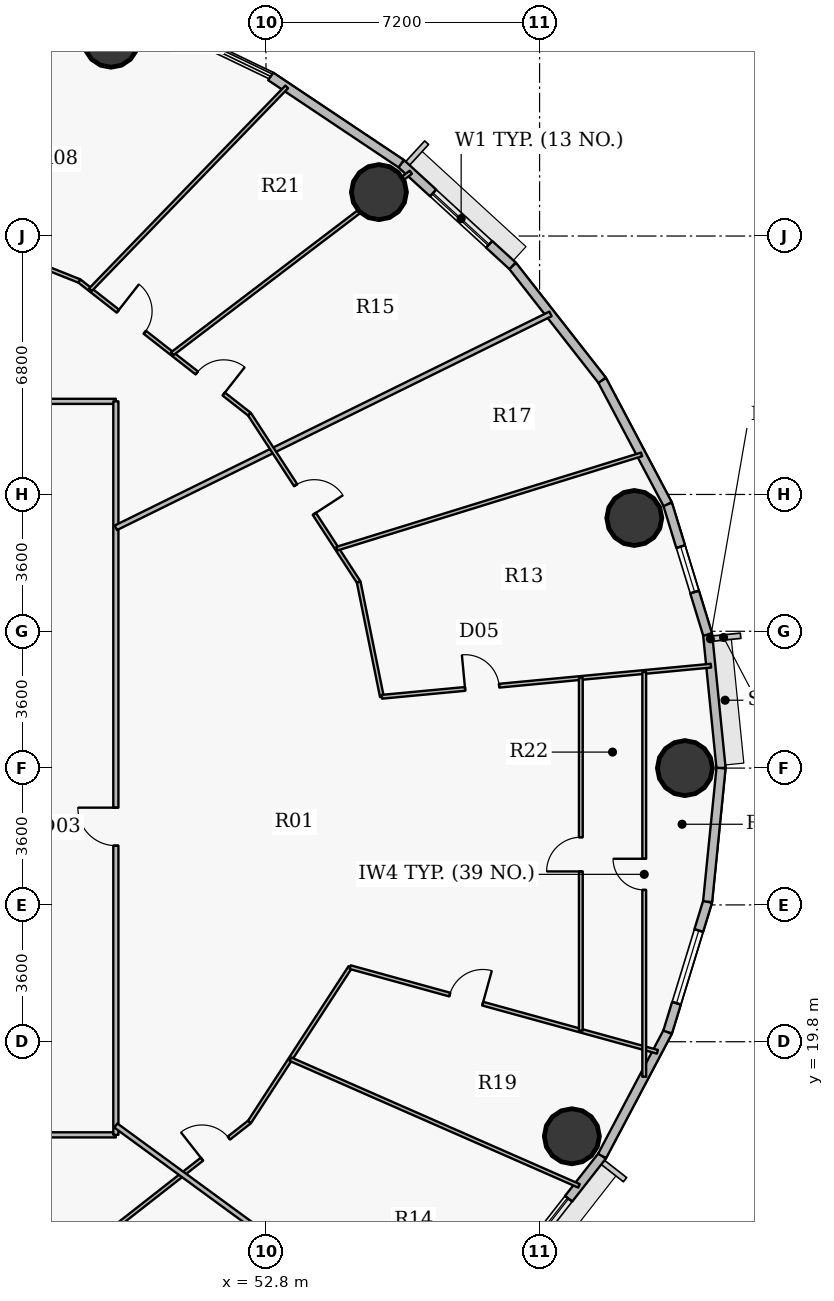
"""IFC4 building model, lengths in metres.
Left out: names, types, materials, properties, quantities, classifications, styles, units other than length and angle.
Written with IfcOpenShell. Run it as: python <this file> out.ifc"""

import sys

from ifc_helpers import new_model, si_unit, direction, frame, frame_2d, origin, origin_2d, place, context, subcontext, project, spatial, rectangle, hollow_circle, extrude, source, transform, mapped, element, fill, save


model = new_model("IFC4")
c1 = context("Model", 3, precision=1e-05, world=origin(), true_north=direction((0.0, 1.0)))
c2 = subcontext(c1, "Body", "Model", "MODEL_VIEW")
j1 = project(units=[si_unit("LENGTHUNIT", "METRE"), si_unit("PLANEANGLEUNIT", "RADIAN")], contexts=[c1])
p1 = place(None, origin())
s1 = spatial("IfcSite", under=j1, at=p1, CompositionType="ELEMENT")
p2 = place(p1, origin())
s2 = spatial("IfcBuilding", under=s1, at=p2, CompositionType="ELEMENT")
p3 = place(p2, frame((0.0, 0.0, 142.2)))
s3 = spatial("IfcBuildingStorey", under=s2, at=p3, CompositionType="ELEMENT", Elevation=142.2)
for number, where, z_axis, x_axis in (
    (1, (63.825, 27.0, 0.0), (0.0, 0.0, 1.0), (1.0, 0.0, 0.0)),
    (2, (62.493, 33.581, 0.0), (0.0, 0.0, 1.0), (1.0, 0.0, 0.0)),
    (3, (55.773, 42.156, 0.0), (0.0, 0.0, 1.0), (1.0, 0.0, 0.0)),
    (4, (48.722, 46.165, 0.0), (0.0, 0.0, 1.0), (1.0, 0.0, 0.0)),
    (5, (60.849, 17.312, 0.0), (0.0, 0.0, 1.0), (1.0, 0.0, 0.0)),
):
    element("IfcColumn", number, at=place(p3, frame(where, z_axis=z_axis, x_axis=x_axis)), inside=s3, PredefinedType="COLUMN", context=c2, shape_type="SweptSolid", body=[
        extrude(hollow_circle(Radius=0.725, WallThickness=0.042, at=origin_2d()), origin(), (0.0, 0.0, 1.0), 3.75),
    ])
p4 = place(p3, frame((64.422, 30.515, 0.0), z_axis=(0.0, 0.0, 1.0), x_axis=(0.099989468229, -0.994988495533, 0.0)))
e6 = element("IfcWall", 6, at=p4, inside=s3, PredefinedType="SOLIDWALL", context=c2, shape_type="SweptSolid", body=[
    extrude(rectangle(XDim=3.533, YDim=0.24, at=frame_2d((1.767, 0.0))), origin(), (0.0, 0.0, 1.0), 3.45),
])
p5 = place(p3, frame((63.37, 33.945, 0.0), z_axis=(0.0, 0.0, 1.0), x_axis=(0.293124431344, -0.956074300329, 0.0)))
e7 = element("IfcWall", 7, at=p5, inside=s3, PredefinedType="SOLIDWALL", context=c2, shape_type="SweptSolid", body=[
    extrude(rectangle(XDim=3.587, YDim=0.24, at=frame_2d((1.793, 0.0))), origin(), (0.0, 0.0, 1.0), 3.45),
])
p6 = place(p5, frame((1.169, 0.0, 0.9)))
e8 = element("IfcOpeningElement", 8, at=p6, cuts=e7, PredefinedType="OPENING", context=c2, shape_type="SweptSolid", body=[
    extrude(rectangle(XDim=1.25, YDim=1.65, at=origin_2d()), frame((0.625, 0.13, 0.825), z_axis=(0.0, -1.0, 0.0), x_axis=(1.0, 0.0, 0.0)), (0.0, 0.0, 1.0), 0.26),
])
p7 = place(p3, frame((61.645, 37.206, 0.0), z_axis=(0.0, 0.0, 1.0), x_axis=(0.467614004126, -0.883932770716, 0.0)))
e9 = element("IfcWall", 9, at=p7, inside=s3, PredefinedType="SOLIDWALL", context=c2, shape_type="SweptSolid", body=[
    extrude(rectangle(XDim=3.689, YDim=0.24, at=frame_2d((1.844, 0.0))), origin(), (0.0, 0.0, 1.0), 3.45),
])
p8 = place(p3, frame((59.289, 40.217, 0.0), z_axis=(0.0, 0.0, 1.0), x_axis=(0.616272103517, -0.787533297345, 0.0)))
e10 = element("IfcWall", 10, at=p8, inside=s3, PredefinedType="SOLIDWALL", context=c2, shape_type="SweptSolid", body=[
    extrude(rectangle(XDim=3.823, YDim=0.24, at=frame_2d((1.912, 0.0))), origin(), (0.0, 0.0, 1.0), 3.45),
])
p9 = place(p3, frame((56.358, 42.903, 0.0), z_axis=(0.0, 0.0, 1.0), x_axis=(0.737113356241, -0.675769117414, 0.0)))
e11 = element("IfcWall", 11, at=p9, inside=s3, PredefinedType="SOLIDWALL", context=c2, shape_type="SweptSolid", body=[
    extrude(rectangle(XDim=3.976, YDim=0.24, at=frame_2d((1.988, 0.0))), origin(), (0.0, 0.0, 1.0), 3.45),
])
p10 = place(p9, frame((1.141, 0.0, 0.9)))
e12 = element("IfcOpeningElement", 12, at=p10, cuts=e11, PredefinedType="OPENING", context=c2, shape_type="SweptSolid", body=[
    extrude(rectangle(XDim=2.0, YDim=1.75, at=origin_2d()), frame((1.0, 0.13, 0.875), z_axis=(0.0, -1.0, 0.0), x_axis=(1.0, 0.0, 0.0)), (0.0, 0.0, 1.0), 0.26),
])
p11 = place(p3, frame((52.925, 45.199, 0.0), z_axis=(0.0, 0.0, 1.0), x_axis=(0.831221811447, -0.555940914284, 0.0)))
e13 = element("IfcWall", 13, at=p11, inside=s3, PredefinedType="SOLIDWALL", context=c2, shape_type="SweptSolid", body=[
    extrude(rectangle(XDim=4.13, YDim=0.24, at=frame_2d((2.065, 0.0))), origin(), (0.0, 0.0, 1.0), 3.45),
])
p12 = place(p3, frame((61.645, 16.794, 0.0), z_axis=(0.0, 0.0, 1.0), x_axis=(-0.616272103517, -0.787533297345, 0.0)))
e14 = element("IfcWall", 14, at=p12, inside=s3, PredefinedType="SOLIDWALL", context=c2, shape_type="SweptSolid", body=[
    extrude(rectangle(XDim=3.823, YDim=0.24, at=frame_2d((1.912, 0.0))), origin(), (0.0, 0.0, 1.0), 3.45),
])
p13 = place(p12, frame((1.43, 0.0, 0.9)))
e15 = element("IfcOpeningElement", 15, at=p13, cuts=e14, PredefinedType="OPENING", context=c2, shape_type="SweptSolid", body=[
    extrude(rectangle(XDim=1.6, YDim=1.75, at=origin_2d()), frame((0.8, 0.13, 0.875), z_axis=(0.0, -1.0, 0.0), x_axis=(1.0, 0.0, 0.0)), (0.0, 0.0, 1.0), 0.26),
])
p14 = place(p3, frame((63.37, 20.055, 0.0), z_axis=(0.0, 0.0, 1.0), x_axis=(-0.467614004126, -0.883932770716, 0.0)))
e16 = element("IfcWall", 16, at=p14, inside=s3, PredefinedType="SOLIDWALL", context=c2, shape_type="SweptSolid", body=[
    extrude(rectangle(XDim=3.689, YDim=0.24, at=frame_2d((1.844, 0.0))), origin(), (0.0, 0.0, 1.0), 3.45),
])
p15 = place(p3, frame((64.422, 23.485, 0.0), z_axis=(0.0, 0.0, 1.0), x_axis=(-0.293124431344, -0.956074300329, 0.0)))
e17 = element("IfcWall", 17, at=p15, inside=s3, PredefinedType="SOLIDWALL", context=c2, shape_type="SweptSolid", body=[
    extrude(rectangle(XDim=3.587, YDim=0.24, at=frame_2d((1.793, 0.0))), origin(), (0.0, 0.0, 1.0), 3.45),
])
p16 = place(p15, frame((0.794, 0.0, 0.9)))
e18 = element("IfcOpeningElement", 18, at=p16, cuts=e17, PredefinedType="OPENING", context=c2, shape_type="SweptSolid", body=[
    extrude(rectangle(XDim=2.0, YDim=1.75, at=origin_2d()), frame((1.0, 0.13, 0.875), z_axis=(0.0, -1.0, 0.0), x_axis=(1.0, 0.0, 0.0)), (0.0, 0.0, 1.0), 0.26),
])
p17 = place(p3, frame((64.775, 27.0, 0.0), z_axis=(0.0, 0.0, 1.0), x_axis=(-0.099989468229, -0.994988495533, 0.0)))
e19 = element("IfcWall", 19, at=p17, inside=s3, PredefinedType="SOLIDWALL", context=c2, shape_type="SweptSolid", body=[
    extrude(rectangle(XDim=3.533, YDim=0.24, at=frame_2d((1.767, 0.0))), origin(), (0.0, 0.0, 1.0), 3.45),
])
p18 = place(p3, frame((36.774, 36.65, 0.0), z_axis=(0.0, 0.0, 1.0), x_axis=(1.0, 0.0, 0.0)))
e20 = element("IfcWall", 20, at=p18, inside=s3, PredefinedType="PARTITIONING", context=c2, shape_type="SweptSolid", body=[
    extrude(rectangle(XDim=12.076, YDim=0.135, at=frame_2d((6.038, 0.0))), origin(), (0.0, 0.0, 1.0), 2.885),
])
p19 = place(p18, frame((5.538, 0.0, 0.0)))
e21 = element("IfcOpeningElement", 21, at=p19, cuts=e20, PredefinedType="OPENING", context=c2, shape_type="SweptSolid", body=[
    extrude(rectangle(XDim=1.0, YDim=2.15, at=origin_2d()), frame((0.5, 0.078, 1.075), z_axis=(0.0, -1.0, 0.0), x_axis=(1.0, 0.0, 0.0)), (0.0, 0.0, 1.0), 0.155),
])
p20 = place(p3, frame((38.477, 17.35, 0.0), z_axis=(0.0, 0.0, 1.0), x_axis=(1.0, 0.0, 0.0)))
e22 = element("IfcWall", 22, at=p20, inside=s3, PredefinedType="PARTITIONING", context=c2, shape_type="SweptSolid", body=[
    extrude(rectangle(XDim=10.373, YDim=0.135, at=frame_2d((5.187, 0.0))), origin(), (0.0, 0.0, 1.0), 2.885),
])
p21 = place(p20, frame((4.687, 0.0, 0.0)))
e23 = element("IfcOpeningElement", 23, at=p21, cuts=e22, PredefinedType="OPENING", context=c2, shape_type="SweptSolid", body=[
    extrude(rectangle(XDim=1.0, YDim=2.15, at=origin_2d()), frame((0.5, 0.078, 1.075), z_axis=(0.0, -1.0, 0.0), x_axis=(1.0, 0.0, 0.0)), (0.0, 0.0, 1.0), 0.155),
])
p22 = place(p3, frame((42.724, 41.877, 0.0), z_axis=(0.0, 0.0, 1.0), x_axis=(0.928806258388, -0.370565695093, 0.0)))
e24 = element("IfcWall", 24, at=p22, inside=s3, PredefinedType="PARTITIONING", context=c2, shape_type="SweptSolid", body=[
    extrude(rectangle(XDim=5.562, YDim=0.1, at=frame_2d((2.781, 0.0))), origin(), (0.0, 0.0, 1.0), 2.885),
])
p23 = place(p3, frame((47.891, 14.184, 0.0), z_axis=(0.0, 0.0, 1.0), x_axis=(0.787333679705, 0.616527109544, 0.0)))
e25 = element("IfcWall", 25, at=p23, inside=s3, PredefinedType="PARTITIONING", context=c2, shape_type="SweptSolid", body=[
    extrude(rectangle(XDim=5.685, YDim=0.1, at=frame_2d((2.842, 0.0))), origin(), (0.0, 0.0, 1.0), 2.885),
])
p24 = place(p23, frame((4.096, 0.0, 0.0)))
e26 = element("IfcOpeningElement", 26, at=p24, cuts=e25, PredefinedType="OPENING", context=c2, shape_type="SweptSolid", body=[
    extrude(rectangle(XDim=0.9, YDim=2.1, at=origin_2d()), frame((0.45, 0.06, 1.05), z_axis=(0.0, -1.0, 0.0), x_axis=(1.0, 0.0, 0.0)), (0.0, 0.0, 1.0), 0.12),
])
p25 = place(p3, frame((47.891, 39.816, 0.0), z_axis=(0.0, 0.0, 1.0), x_axis=(0.787347250317, -0.61650977885, 0.0)))
e27 = element("IfcWall", 27, at=p25, inside=s3, PredefinedType="PARTITIONING", context=c2, shape_type="SweptSolid", body=[
    extrude(rectangle(XDim=5.683, YDim=0.1, at=frame_2d((2.842, 0.0))), origin(), (0.0, 0.0, 1.0), 2.885),
])
p26 = place(p25, frame((3.923, 0.0, 0.0)))
e28 = element("IfcOpeningElement", 28, at=p26, cuts=e27, PredefinedType="OPENING", context=c2, shape_type="SweptSolid", body=[
    extrude(rectangle(XDim=0.9, YDim=2.1, at=origin_2d()), frame((0.45, 0.06, 1.05), z_axis=(0.0, -1.0, 0.0), x_axis=(1.0, 0.0, 0.0)), (0.0, 0.0, 1.0), 0.12),
])
p27 = place(p25, frame((1.286, 0.0, 0.0)))
e29 = element("IfcOpeningElement", 29, at=p27, cuts=e27, PredefinedType="OPENING", context=c2, shape_type="SweptSolid", body=[
    extrude(rectangle(XDim=0.9, YDim=2.1, at=origin_2d()), frame((0.45, 0.06, 1.05), z_axis=(0.0, -1.0, 0.0), x_axis=(1.0, 0.0, 0.0)), (0.0, 0.0, 1.0), 0.12),
])
p28 = place(p3, frame((48.182, 39.588, 0.0), z_axis=(0.0, 0.0, 1.0), x_axis=(0.695422522839, 0.718601081775, 0.0)))
e30 = element("IfcWall", 30, at=p28, inside=s3, PredefinedType="PARTITIONING", context=c2, shape_type="SweptSolid", body=[
    extrude(rectangle(XDim=7.426, YDim=0.1, at=frame_2d((3.713, 0.0))), origin(), (0.0, 0.0, 1.0), 2.885),
])
p29 = place(p3, frame((48.85, 17.35, 0.0), z_axis=(0.0, 0.0, 1.0), x_axis=(0.0, 1.0, 0.0)))
e31 = element("IfcWall", 31, at=p29, inside=s3, PredefinedType="PARTITIONING", context=c2, shape_type="SweptSolid", body=[
    extrude(rectangle(XDim=19.3, YDim=0.135, at=frame_2d((9.65, 0.0))), origin(), (0.0, 0.0, 1.0), 2.885),
])
p30 = place(p29, frame((7.609, 0.0, 0.0)))
e32 = element("IfcOpeningElement", 32, at=p30, cuts=e31, PredefinedType="OPENING", context=c2, shape_type="SweptSolid", body=[
    extrude(rectangle(XDim=1.0, YDim=2.15, at=origin_2d()), frame((0.5, 0.078, 1.075), z_axis=(0.0, -1.0, 0.0), x_axis=(1.0, 0.0, 0.0)), (0.0, 0.0, 1.0), 0.155),
])
p31 = place(p3, frame((48.85, 17.595, 0.0), z_axis=(0.0, 0.0, 1.0), x_axis=(0.806958414, -0.590608261096, 0.0)))
e33 = element("IfcWall", 33, at=p31, inside=s3, PredefinedType="PARTITIONING", context=c2, shape_type="SweptSolid", body=[
    extrude(rectangle(XDim=10.063, YDim=0.135, at=frame_2d((5.032, 0.0))), origin(), (0.0, 0.0, 1.0), 2.885),
])
p32 = place(p3, frame((48.85, 33.323, 0.0), z_axis=(0.0, 0.0, 1.0), x_axis=(0.897255437174, 0.44151181237, 0.0)))
e34 = element("IfcWall", 34, at=p32, inside=s3, PredefinedType="PARTITIONING", context=c2, shape_type="SweptSolid", body=[
    extrude(rectangle(XDim=12.746, YDim=0.135, at=frame_2d((6.373, 0.0))), origin(), (0.0, 0.0, 1.0), 2.885),
])
p33 = place(p3, frame((50.334, 37.903, 0.0), z_axis=(0.0, 0.0, 1.0), x_axis=(0.795918180565, 0.60540420369, 0.0)))
e35 = element("IfcWall", 35, at=p33, inside=s3, PredefinedType="PARTITIONING", context=c2, shape_type="SweptSolid", body=[
    extrude(rectangle(XDim=7.887, YDim=0.1, at=frame_2d((3.944, 0.0))), origin(), (0.0, 0.0, 1.0), 2.885),
])
p34 = place(p3, frame((52.366, 17.689, 0.0), z_axis=(0.0, 0.0, 1.0), x_axis=(0.545413870093, 0.838166874978, 0.0)))
e36 = element("IfcWall", 36, at=p34, inside=s3, PredefinedType="PARTITIONING", context=c2, shape_type="SweptSolid", body=[
    extrude(rectangle(XDim=4.859, YDim=0.1, at=frame_2d((2.43, 0.0))), origin(), (0.0, 0.0, 1.0), 2.885),
])
p35 = place(p3, frame((52.366, 36.311, 0.0), z_axis=(0.0, 0.0, 1.0), x_axis=(0.545405249109, -0.838172484781, 0.0)))
e37 = element("IfcWall", 37, at=p35, inside=s3, PredefinedType="PARTITIONING", context=c2, shape_type="SweptSolid", body=[
    extrude(rectangle(XDim=5.269, YDim=0.1, at=frame_2d((2.634, 0.0))), origin(), (0.0, 0.0, 1.0), 2.885),
])
p36 = place(p35, frame((2.228, 0.0, 0.0)))
e38 = element("IfcOpeningElement", 38, at=p36, cuts=e37, PredefinedType="OPENING", context=c2, shape_type="SweptSolid", body=[
    extrude(rectangle(XDim=0.9, YDim=2.1, at=origin_2d()), frame((0.45, 0.06, 1.05), z_axis=(0.0, -1.0, 0.0), x_axis=(1.0, 0.0, 0.0)), (0.0, 0.0, 1.0), 0.12),
])
p37 = place(p3, frame((53.442, 19.342, 0.0), z_axis=(0.0, 0.0, 1.0), x_axis=(0.91563160904, -0.402018353469, 0.0)))
e39 = element("IfcWall", 39, at=p37, inside=s3, PredefinedType="PARTITIONING", context=c2, shape_type="SweptSolid", body=[
    extrude(rectangle(XDim=8.294, YDim=0.1, at=frame_2d((4.147, 0.0))), origin(), (0.0, 0.0, 1.0), 2.885),
])
p38 = place(p3, frame((54.668, 32.774, 0.0), z_axis=(0.0, 0.0, 1.0), x_axis=(0.955345753083, 0.295490257144, 0.0)))
e40 = element("IfcWall", 40, at=p38, inside=s3, PredefinedType="PARTITIONING", context=c2, shape_type="SweptSolid", body=[
    extrude(rectangle(XDim=8.39, YDim=0.1, at=frame_2d((4.195, 0.0))), origin(), (0.0, 0.0, 1.0), 2.885),
])
p39 = place(p3, frame((55.017, 21.762, 0.0), z_axis=(0.0, 0.0, 1.0), x_axis=(0.964092156587, -0.265567907714, 0.0)))
e41 = element("IfcWall", 41, at=p39, inside=s3, PredefinedType="PARTITIONING", context=c2, shape_type="SweptSolid", body=[
    extrude(rectangle(XDim=8.385, YDim=0.1, at=frame_2d((4.192, 0.0))), origin(), (0.0, 0.0, 1.0), 2.885),
])
p40 = place(p39, frame((2.717, 0.0, 0.0)))
e42 = element("IfcOpeningElement", 42, at=p40, cuts=e41, PredefinedType="OPENING", context=c2, shape_type="SweptSolid", body=[
    extrude(rectangle(XDim=0.9, YDim=2.1, at=origin_2d()), frame((0.45, 0.06, 1.05), z_axis=(0.0, -1.0, 0.0), x_axis=(1.0, 0.0, 0.0)), (0.0, 0.0, 1.0), 0.12),
])
p41 = place(p3, frame((55.24, 31.895, 0.0), z_axis=(0.0, 0.0, 1.0), x_axis=(0.198189059207, -0.980163811213, 0.0)))
e43 = element("IfcWall", 43, at=p41, inside=s3, PredefinedType="PARTITIONING", context=c2, shape_type="SweptSolid", body=[
    extrude(rectangle(XDim=3.08, YDim=0.1, at=frame_2d((1.54, 0.0))), origin(), (0.0, 0.0, 1.0), 2.885),
])
p42 = place(p3, frame((55.85, 28.876, 0.0), z_axis=(0.0, 0.0, 1.0), x_axis=(0.995563342767, 0.094093732729, 0.0)))
e44 = element("IfcWall", 44, at=p42, inside=s3, PredefinedType="PARTITIONING", context=c2, shape_type="SweptSolid", body=[
    extrude(rectangle(XDim=8.697, YDim=0.1, at=frame_2d((4.349, 0.0))), origin(), (0.0, 0.0, 1.0), 2.885),
])
p43 = place(p42, frame((2.199, 0.0, 0.0)))
e45 = element("IfcOpeningElement", 45, at=p43, cuts=e44, PredefinedType="OPENING", context=c2, shape_type="SweptSolid", body=[
    extrude(rectangle(XDim=0.9, YDim=2.1, at=origin_2d()), frame((0.45, 0.06, 1.05), z_axis=(0.0, -1.0, 0.0), x_axis=(1.0, 0.0, 0.0)), (0.0, 0.0, 1.0), 0.12),
])
p44 = place(p3, frame((61.085, 20.09, 0.0), z_axis=(0.0, 0.0, 1.0), x_axis=(0.0, 1.0, 0.0)))
e46 = element("IfcWall", 46, at=p44, inside=s3, PredefinedType="PARTITIONING", context=c2, shape_type="SweptSolid", body=[
    extrude(rectangle(XDim=9.281, YDim=0.1, at=frame_2d((4.641, 0.0))), origin(), (0.0, 0.0, 1.0), 2.885),
])
p45 = place(p44, frame((4.19, 0.0, 0.0)))
e47 = element("IfcOpeningElement", 47, at=p45, cuts=e46, PredefinedType="OPENING", context=c2, shape_type="SweptSolid", body=[
    extrude(rectangle(XDim=0.9, YDim=2.1, at=origin_2d()), frame((0.45, 0.06, 1.05), z_axis=(0.0, -1.0, 0.0), x_axis=(1.0, 0.0, 0.0)), (0.0, 0.0, 1.0), 0.12),
])
p46 = place(p3, frame((62.754, 18.88, 0.0), z_axis=(0.0, 0.0, 1.0), x_axis=(0.0, 1.0, 0.0)))
e48 = element("IfcWall", 48, at=p46, inside=s3, PredefinedType="PARTITIONING", context=c2, shape_type="SweptSolid", body=[
    extrude(rectangle(XDim=10.649, YDim=0.1, at=frame_2d((5.325, 0.0))), origin(), (0.0, 0.0, 1.0), 2.885),
])
p47 = place(p46, frame((4.915, 0.0, 0.0)))
e49 = element("IfcOpeningElement", 49, at=p47, cuts=e48, PredefinedType="OPENING", context=c2, shape_type="SweptSolid", body=[
    extrude(rectangle(XDim=0.82, YDim=2.1, at=origin_2d()), frame((0.41, 0.06, 1.05), z_axis=(0.0, -1.0, 0.0), x_axis=(1.0, 0.0, 0.0)), (0.0, 0.0, 1.0), 0.12),
])
m1 = source(origin(), c2, "Body", "SweptSolid", [
    extrude(rectangle(XDim=2.0, YDim=1.75, at=origin_2d()), frame((1.0, 0.03, 0.875), z_axis=(0.0, -1.0, 0.0), x_axis=(1.0, 0.0, 0.0)), (0.0, 0.0, 1.0), 0.06),
])
p48 = place(p10, origin())
e50 = element("IfcWindow", 50, at=p48, inside=s3, PartitioningType="DOUBLE_PANEL_VERTICAL", PredefinedType="WINDOW", context=c2, shape_type="MappedRepresentation", body=[
    mapped(m1, transform((0.0, 0.0, 0.0), x_axis=(1.0, 0.0, 0.0), y_axis=(0.0, 1.0, 0.0), z_axis=(0.0, 0.0, 1.0), scale=1.0)),
])
fill(e12, e50)
m2 = source(origin(), c2, "Body", "SweptSolid", [
    extrude(rectangle(XDim=1.6, YDim=1.75, at=origin_2d()), frame((0.8, 0.03, 0.875), z_axis=(0.0, -1.0, 0.0), x_axis=(1.0, 0.0, 0.0)), (0.0, 0.0, 1.0), 0.06),
])
p49 = place(p13, origin())
e51 = element("IfcWindow", 51, at=p49, inside=s3, PartitioningType="DOUBLE_PANEL_VERTICAL", PredefinedType="WINDOW", context=c2, shape_type="MappedRepresentation", body=[
    mapped(m2, transform((0.0, 0.0, 0.0), x_axis=(1.0, 0.0, 0.0), y_axis=(0.0, 1.0, 0.0), z_axis=(0.0, 0.0, 1.0), scale=1.0)),
])
fill(e15, e51)
p50 = place(p16, origin())
e52 = element("IfcWindow", 52, at=p50, inside=s3, PartitioningType="DOUBLE_PANEL_VERTICAL", PredefinedType="WINDOW", context=c2, shape_type="MappedRepresentation", body=[
    mapped(m1, transform((0.0, 0.0, 0.0), x_axis=(1.0, 0.0, 0.0), y_axis=(0.0, 1.0, 0.0), z_axis=(0.0, 0.0, 1.0), scale=1.0)),
])
fill(e18, e52)
m3 = source(origin(), c2, "Body", "SweptSolid", [
    extrude(rectangle(XDim=1.25, YDim=1.65, at=origin_2d()), frame((0.625, 0.03, 0.825), z_axis=(0.0, -1.0, 0.0), x_axis=(1.0, 0.0, 0.0)), (0.0, 0.0, 1.0), 0.06),
])
p51 = place(p6, origin())
e53 = element("IfcWindow", 53, at=p51, inside=s3, PartitioningType="SINGLE_PANEL", PredefinedType="WINDOW", context=c2, shape_type="MappedRepresentation", body=[
    mapped(m3, transform((0.0, 0.0, 0.0), x_axis=(1.0, 0.0, 0.0), y_axis=(0.0, 1.0, 0.0), z_axis=(0.0, 0.0, 1.0), scale=1.0)),
])
fill(e8, e53)
m4 = source(origin(), c2, "Body", "SweptSolid", [
    extrude(rectangle(XDim=1.0, YDim=2.15, at=origin_2d()), frame((0.5, 0.025, 1.075), z_axis=(0.0, -1.0, 0.0), x_axis=(1.0, 0.0, 0.0)), (0.0, 0.0, 1.0), 0.05),
])
p52 = place(p30, origin())
e54 = element("IfcDoor", 54, at=p52, inside=s3, OperationType="SINGLE_SWING_RIGHT", PredefinedType="DOOR", context=c2, shape_type="MappedRepresentation", body=[
    mapped(m4, transform((0.0, 0.0, 0.0), x_axis=(1.0, 0.0, 0.0), y_axis=(0.0, 1.0, 0.0), z_axis=(0.0, 0.0, 1.0), scale=1.0)),
])
fill(e32, e54)
m5 = source(origin(), c2, "Body", "SweptSolid", [
    extrude(rectangle(XDim=0.9, YDim=2.1, at=origin_2d()), frame((0.45, 0.025, 1.05), z_axis=(0.0, -1.0, 0.0), x_axis=(1.0, 0.0, 0.0)), (0.0, 0.0, 1.0), 0.05),
])
p53 = place(p24, origin())
e55 = element("IfcDoor", 55, at=p53, inside=s3, OperationType="SINGLE_SWING_LEFT", PredefinedType="DOOR", context=c2, shape_type="MappedRepresentation", body=[
    mapped(m5, transform((0.0, 0.0, 0.0), x_axis=(1.0, 0.0, 0.0), y_axis=(0.0, 1.0, 0.0), z_axis=(0.0, 0.0, 1.0), scale=1.0)),
])
fill(e26, e55)
p54 = place(p40, origin())
e56 = element("IfcDoor", 56, at=p54, inside=s3, OperationType="SINGLE_SWING_RIGHT", PredefinedType="DOOR", context=c2, shape_type="MappedRepresentation", body=[
    mapped(m5, transform((0.0, 0.0, 0.0), x_axis=(1.0, 0.0, 0.0), y_axis=(0.0, 1.0, 0.0), z_axis=(0.0, 0.0, 1.0), scale=1.0)),
])
fill(e42, e56)
p55 = place(p43, origin())
e57 = element("IfcDoor", 57, at=p55, inside=s3, OperationType="SINGLE_SWING_LEFT", PredefinedType="DOOR", context=c2, shape_type="MappedRepresentation", body=[
    mapped(m5, transform((0.0, 0.0, 0.0), x_axis=(1.0, 0.0, 0.0), y_axis=(0.0, 1.0, 0.0), z_axis=(0.0, 0.0, 1.0), scale=1.0)),
])
fill(e45, e57)
p56 = place(p36, origin())
e58 = element("IfcDoor", 58, at=p56, inside=s3, OperationType="SINGLE_SWING_RIGHT", PredefinedType="DOOR", context=c2, shape_type="MappedRepresentation", body=[
    mapped(m5, transform((0.0, 0.0, 0.0), x_axis=(1.0, 0.0, 0.0), y_axis=(0.0, 1.0, 0.0), z_axis=(0.0, 0.0, 1.0), scale=1.0)),
])
fill(e38, e58)
p57 = place(p45, origin())
e59 = element("IfcDoor", 59, at=p57, inside=s3, OperationType="SINGLE_SWING_LEFT", PredefinedType="DOOR", context=c2, shape_type="MappedRepresentation", body=[
    mapped(m5, transform((0.0, 0.0, 0.0), x_axis=(1.0, 0.0, 0.0), y_axis=(0.0, 1.0, 0.0), z_axis=(0.0, 0.0, 1.0), scale=1.0)),
])
fill(e47, e59)
m6 = source(origin(), c2, "Body", "SweptSolid", [
    extrude(rectangle(XDim=0.82, YDim=2.1, at=origin_2d()), frame((0.41, 0.025, 1.05), z_axis=(0.0, -1.0, 0.0), x_axis=(1.0, 0.0, 0.0)), (0.0, 0.0, 1.0), 0.05),
])
p58 = place(p47, origin())
e60 = element("IfcDoor", 60, at=p58, inside=s3, OperationType="SINGLE_SWING_RIGHT", PredefinedType="DOOR", context=c2, shape_type="MappedRepresentation", body=[
    mapped(m6, transform((0.0, 0.0, 0.0), x_axis=(1.0, 0.0, 0.0), y_axis=(0.0, 1.0, 0.0), z_axis=(0.0, 0.0, 1.0), scale=1.0)),
])
fill(e49, e60)
p59 = place(p26, origin())
e61 = element("IfcDoor", 61, at=p59, inside=s3, OperationType="SINGLE_SWING_RIGHT", PredefinedType="DOOR", context=c2, shape_type="MappedRepresentation", body=[
    mapped(m5, transform((0.0, 0.0, 0.0), x_axis=(1.0, 0.0, 0.0), y_axis=(0.0, 1.0, 0.0), z_axis=(0.0, 0.0, 1.0), scale=1.0)),
])
fill(e28, e61)
p60 = place(p27, origin())
e62 = element("IfcDoor", 62, at=p60, inside=s3, OperationType="SINGLE_SWING_LEFT", PredefinedType="DOOR", context=c2, shape_type="MappedRepresentation", body=[
    mapped(m5, transform((0.0, 0.0, 0.0), x_axis=(1.0, 0.0, 0.0), y_axis=(0.0, 1.0, 0.0), z_axis=(0.0, 0.0, 1.0), scale=1.0)),
])
fill(e29, e62)
save(model, sys.argv[1])
